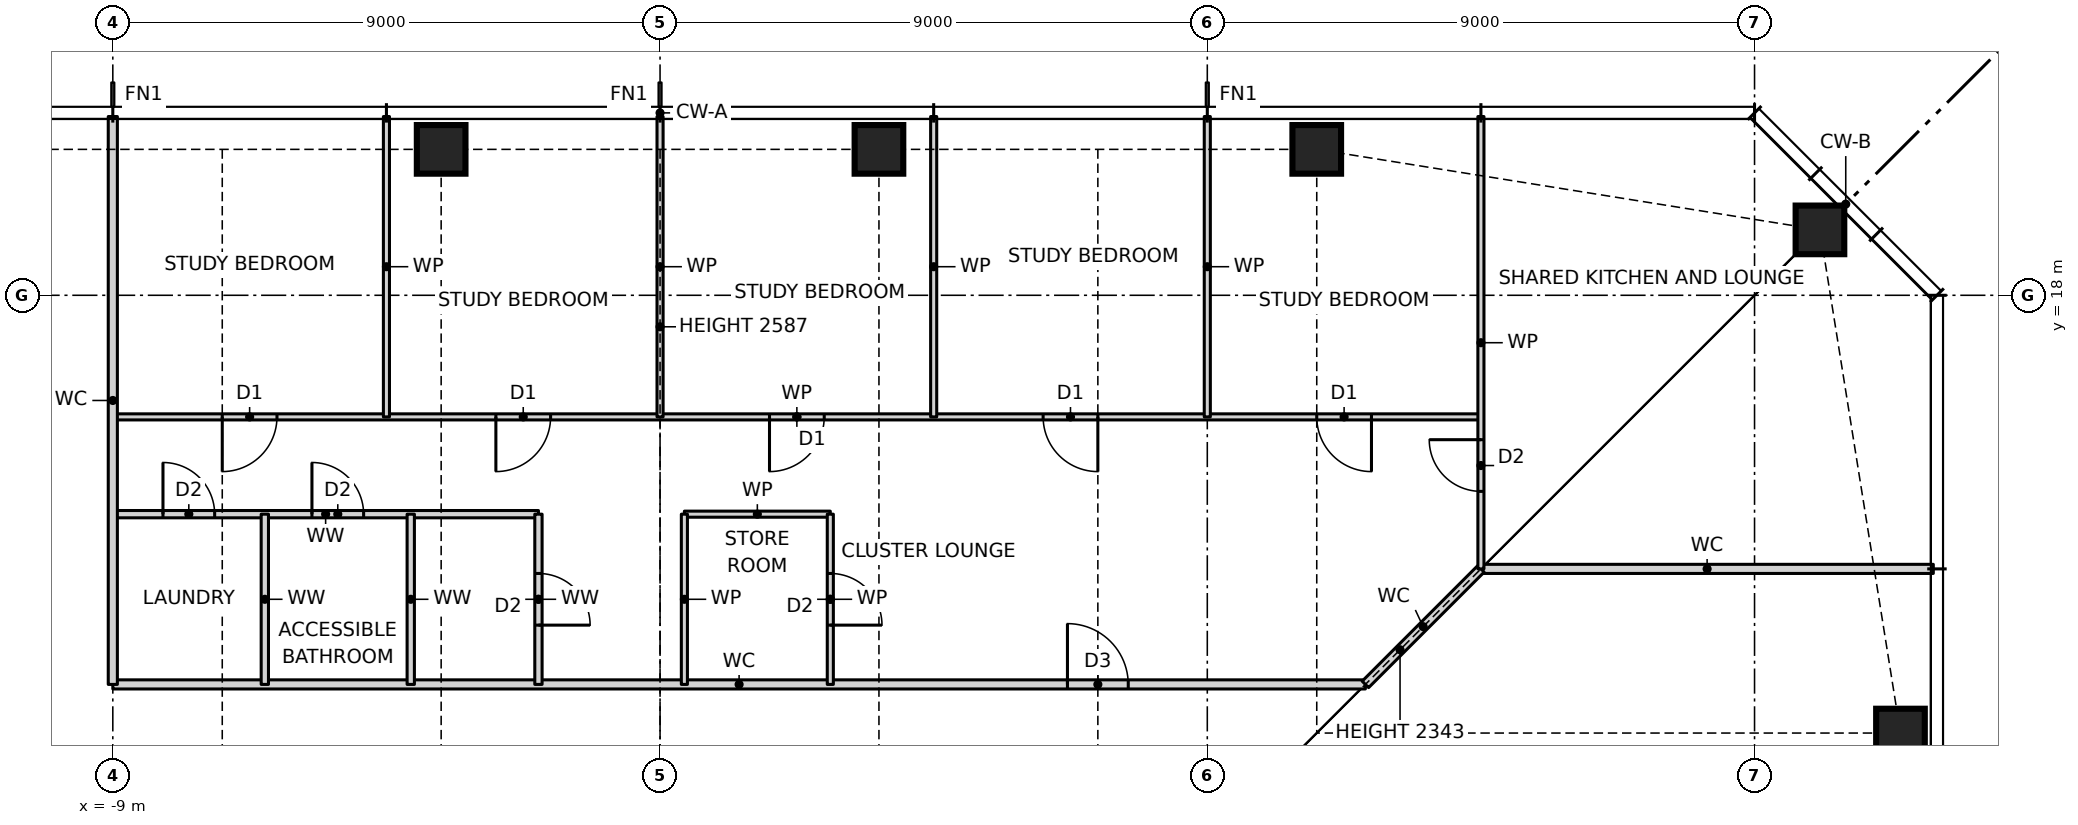
"""IFC4 building model, lengths in metres.
Left out: names, types, materials, properties, quantities, classifications, styles, units other than length and angle.
Written with IfcOpenShell. Run it as: python <this file> out.ifc"""

import sys

from ifc_helpers import new_model, si_unit, direction, frame, frame_2d, origin, origin_2d, place, context, subcontext, project, spatial, rectangle, hollow_rectangle, extrude, element, fill, save


model = new_model("IFC4")
c1 = context("Model", 3, precision=1e-05, world=origin(), true_north=direction((0.0, 1.0)))
c2 = subcontext(c1, "Body", "Model", "MODEL_VIEW")
j1 = project(units=[si_unit("LENGTHUNIT", "METRE"), si_unit("PLANEANGLEUNIT", "RADIAN")], contexts=[c1])
p1 = place(None, origin())
s1 = spatial("IfcSite", under=j1, at=p1, CompositionType="ELEMENT")
p2 = place(p1, origin())
s2 = spatial("IfcBuilding", under=s1, at=p2, CompositionType="ELEMENT")
p3 = place(p2, frame((0.0, 0.0, 91.0)))
s3 = spatial("IfcBuildingStorey", under=s2, at=p3, CompositionType="ELEMENT", Elevation=91.0)
for number, where, z_axis, x_axis in (
    (1, (20.4, 10.8, 0.0), (0.0, 0.0, 1.0), (1.0, 0.0, 0.0)),
    (2, (19.076, 19.076, 0.0), (0.0, 0.0, 1.0), (1.0, 0.0, 0.0)),
    (3, (10.8, 20.4, 0.0), (0.0, 0.0, 1.0), (1.0, 0.0, 0.0)),
    (4, (3.6, 20.4, 0.0), (0.0, 0.0, 1.0), (1.0, 0.0, 0.0)),
    (5, (-3.6, 20.4, 0.0), (0.0, 0.0, 1.0), (1.0, 0.0, 0.0)),
):
    element("IfcColumn", number, at=place(p3, frame(where, z_axis=z_axis, x_axis=x_axis)), inside=s3, PredefinedType="COLUMN", context=c2, shape_type="SweptSolid", body=[
        extrude(hollow_rectangle(XDim=0.8, YDim=0.8, WallThickness=0.07, at=origin_2d()), origin(), (0.0, 0.0, 1.0), 3.5),
    ])
p4 = place(p3, frame((-9.0, 11.6, 0.0), z_axis=(0.0, 0.0, 1.0), x_axis=(1.0, 0.0, 0.0)))
e6 = element("IfcWall", 6, at=p4, inside=s3, PredefinedType="PARTITIONING", context=c2, shape_type="SweptSolid", body=[
    extrude(rectangle(XDim=20.6, YDim=0.15, at=frame_2d((10.3, 0.0))), origin(), (0.0, 0.0, 1.0), 3.27),
])
p5 = place(p4, frame((15.7, 0.0, 0.0)))
e7 = element("IfcOpeningElement", 7, at=p5, cuts=e6, PredefinedType="OPENING", context=c2, shape_type="SweptSolid", body=[
    extrude(rectangle(XDim=1.0, YDim=2.1, at=frame_2d((0.5, 1.05))), frame((0.0, 0.085, 0.0), z_axis=(0.0, -1.0, 0.0), x_axis=(1.0, 0.0, 0.0)), (0.0, 0.0, 1.0), 0.17),
])
p6 = place(p3, frame((13.5, 13.5, 0.0), z_axis=(0.0, 0.0, 1.0), x_axis=(1.0, 0.0, 0.0)))
e8 = element("IfcWall", 8, at=p6, inside=s3, PredefinedType="PARTITIONING", context=c2, shape_type="SweptSolid", body=[
    extrude(rectangle(XDim=7.44, YDim=0.15, at=frame_2d((3.72, 0.0))), origin(), (0.0, 0.0, 1.0), 3.27),
])
p7 = place(p3, frame((-9.0, 14.4, 0.0), z_axis=(0.0, 0.0, 1.0), x_axis=(1.0, 0.0, 0.0)))
e9 = element("IfcWall", 9, at=p7, inside=s3, PredefinedType="PARTITIONING", context=c2, shape_type="SweptSolid", body=[
    extrude(rectangle(XDim=7.0, YDim=0.12, at=frame_2d((3.5, 0.0))), origin(), (0.0, 0.0, 1.0), 3.27),
])
p8 = place(p7, frame((3.275, 0.0, 0.0)))
e10 = element("IfcOpeningElement", 10, at=p8, cuts=e9, PredefinedType="OPENING", context=c2, shape_type="SweptSolid", body=[
    extrude(rectangle(XDim=0.85, YDim=2.1, at=frame_2d((0.425, 1.05))), frame((0.0, 0.07, 0.0), z_axis=(0.0, -1.0, 0.0), x_axis=(1.0, 0.0, 0.0)), (0.0, 0.0, 1.0), 0.14),
])
p9 = place(p7, frame((0.825, 0.0, 0.0)))
e11 = element("IfcOpeningElement", 11, at=p9, cuts=e9, PredefinedType="OPENING", context=c2, shape_type="SweptSolid", body=[
    extrude(rectangle(XDim=0.85, YDim=2.1, at=frame_2d((0.425, 1.05))), frame((0.0, 0.07, 0.0), z_axis=(0.0, -1.0, 0.0), x_axis=(1.0, 0.0, 0.0)), (0.0, 0.0, 1.0), 0.14),
])
p10 = place(p3, frame((0.4, 14.4, 0.0), z_axis=(0.0, 0.0, 1.0), x_axis=(1.0, 0.0, 0.0)))
e12 = element("IfcWall", 12, at=p10, inside=s3, PredefinedType="PARTITIONING", context=c2, shape_type="SweptSolid", body=[
    extrude(rectangle(XDim=2.4, YDim=0.1, at=frame_2d((1.2, 0.0))), origin(), (0.0, 0.0, 1.0), 3.27),
])
p11 = place(p3, frame((-9.0, 16.0, 0.0), z_axis=(0.0, 0.0, 1.0), x_axis=(1.0, 0.0, 0.0)))
e13 = element("IfcWall", 13, at=p11, inside=s3, PredefinedType="PARTITIONING", context=c2, shape_type="SweptSolid", body=[
    extrude(rectangle(XDim=22.5, YDim=0.1, at=frame_2d((11.25, 0.0))), origin(), (0.0, 0.0, 1.0), 3.27),
])
p12 = place(p11, frame((19.8, 0.0, 0.0)))
e14 = element("IfcOpeningElement", 14, at=p12, cuts=e13, PredefinedType="OPENING", context=c2, shape_type="SweptSolid", body=[
    extrude(rectangle(XDim=0.9, YDim=2.1, at=frame_2d((0.45, 1.05))), frame((0.0, 0.06, 0.0), z_axis=(0.0, -1.0, 0.0), x_axis=(1.0, 0.0, 0.0)), (0.0, 0.0, 1.0), 0.12),
])
p13 = place(p11, frame((15.3, 0.0, 0.0)))
e15 = element("IfcOpeningElement", 15, at=p13, cuts=e13, PredefinedType="OPENING", context=c2, shape_type="SweptSolid", body=[
    extrude(rectangle(XDim=0.9, YDim=2.1, at=frame_2d((0.45, 1.05))), frame((0.0, 0.06, 0.0), z_axis=(0.0, -1.0, 0.0), x_axis=(1.0, 0.0, 0.0)), (0.0, 0.0, 1.0), 0.12),
])
p14 = place(p11, frame((10.8, 0.0, 0.0)))
e16 = element("IfcOpeningElement", 16, at=p14, cuts=e13, PredefinedType="OPENING", context=c2, shape_type="SweptSolid", body=[
    extrude(rectangle(XDim=0.9, YDim=2.1, at=frame_2d((0.45, 1.05))), frame((0.0, 0.06, 0.0), z_axis=(0.0, -1.0, 0.0), x_axis=(1.0, 0.0, 0.0)), (0.0, 0.0, 1.0), 0.12),
])
p15 = place(p11, frame((6.3, 0.0, 0.0)))
e17 = element("IfcOpeningElement", 17, at=p15, cuts=e13, PredefinedType="OPENING", context=c2, shape_type="SweptSolid", body=[
    extrude(rectangle(XDim=0.9, YDim=2.1, at=frame_2d((0.45, 1.05))), frame((0.0, 0.06, 0.0), z_axis=(0.0, -1.0, 0.0), x_axis=(1.0, 0.0, 0.0)), (0.0, 0.0, 1.0), 0.12),
])
p16 = place(p11, frame((1.8, 0.0, 0.0)))
e18 = element("IfcOpeningElement", 18, at=p16, cuts=e13, PredefinedType="OPENING", context=c2, shape_type="SweptSolid", body=[
    extrude(rectangle(XDim=0.9, YDim=2.1, at=frame_2d((0.45, 1.05))), frame((0.0, 0.06, 0.0), z_axis=(0.0, -1.0, 0.0), x_axis=(1.0, 0.0, 0.0)), (0.0, 0.0, 1.0), 0.12),
])
p17 = place(p3, frame((11.6, 11.6, 0.0), z_axis=(0.0, 0.0, 1.0), x_axis=(0.707106781187, 0.707106781187, 0.0)))
e19 = element("IfcWall", 19, at=p17, inside=s3, PredefinedType="PARTITIONING", context=c2, shape_type="SweptSolid", body=[
    extrude(rectangle(XDim=2.687, YDim=0.15, at=frame_2d((1.343, 0.0))), origin(), (0.0, 0.0, 1.0), 2.343),
])
p18 = place(p3, frame((13.5, 13.5, 0.0), z_axis=(0.0, 0.0, 1.0), x_axis=(0.0, 1.0, 0.0)))
e20 = element("IfcWall", 20, at=p18, inside=s3, PredefinedType="PARTITIONING", context=c2, shape_type="SweptSolid", body=[
    extrude(rectangle(XDim=7.44, YDim=0.1, at=frame_2d((3.72, 0.0))), origin(), (0.0, 0.0, 1.0), 3.27),
])
p19 = place(p18, frame((1.275, 0.0, 0.0)))
e21 = element("IfcOpeningElement", 21, at=p19, cuts=e20, PredefinedType="OPENING", context=c2, shape_type="SweptSolid", body=[
    extrude(rectangle(XDim=0.85, YDim=2.1, at=frame_2d((0.425, 1.05))), frame((0.0, 0.06, 0.0), z_axis=(0.0, -1.0, 0.0), x_axis=(1.0, 0.0, 0.0)), (0.0, 0.0, 1.0), 0.12),
])
for number, where, z_axis, x_axis in (
    (22, (9.0, 16.0, 0.0), (0.0, 0.0, 1.0), (0.0, 1.0, 0.0)),
    (23, (4.5, 16.0, 0.0), (0.0, 0.0, 1.0), (0.0, 1.0, 0.0)),
):
    element("IfcWall", number, at=place(p3, frame(where, z_axis=z_axis, x_axis=x_axis)), inside=s3, PredefinedType="PARTITIONING", context=c2, shape_type="SweptSolid", body=[
        extrude(rectangle(XDim=4.94, YDim=0.1, at=frame_2d((2.47, 0.0))), origin(), (0.0, 0.0, 1.0), 3.27),
    ])
p20 = place(p3, frame((2.8, 11.6, 0.0), z_axis=(0.0, 0.0, 1.0), x_axis=(0.0, 1.0, 0.0)))
e24 = element("IfcWall", 24, at=p20, inside=s3, PredefinedType="PARTITIONING", context=c2, shape_type="SweptSolid", body=[
    extrude(rectangle(XDim=2.8, YDim=0.1, at=frame_2d((1.4, 0.0))), origin(), (0.0, 0.0, 1.0), 3.27),
])
p21 = place(p20, frame((0.975, 0.0, 0.0)))
e25 = element("IfcOpeningElement", 25, at=p21, cuts=e24, PredefinedType="OPENING", context=c2, shape_type="SweptSolid", body=[
    extrude(rectangle(XDim=0.85, YDim=2.1, at=frame_2d((0.425, 1.05))), frame((0.0, 0.06, 0.0), z_axis=(0.0, -1.0, 0.0), x_axis=(1.0, 0.0, 0.0)), (0.0, 0.0, 1.0), 0.12),
])
p22 = place(p3, frame((0.4, 11.6, 0.0), z_axis=(0.0, 0.0, 1.0), x_axis=(0.0, 1.0, 0.0)))
e26 = element("IfcWall", 26, at=p22, inside=s3, PredefinedType="PARTITIONING", context=c2, shape_type="SweptSolid", body=[
    extrude(rectangle(XDim=2.8, YDim=0.1, at=frame_2d((1.4, 0.0))), origin(), (0.0, 0.0, 1.0), 3.27),
])
p23 = place(p3, frame((0.0, 16.0, 0.0), z_axis=(0.0, 0.0, 1.0), x_axis=(0.0, 1.0, 0.0)))
e27 = element("IfcWall", 27, at=p23, inside=s3, PredefinedType="PARTITIONING", context=c2, shape_type="SweptSolid", body=[
    extrude(rectangle(XDim=4.94, YDim=0.1, at=frame_2d((2.47, 0.0))), origin(), (0.0, 0.0, 1.0), 2.587),
])
p24 = place(p3, frame((-2.0, 11.6, 0.0), z_axis=(0.0, 0.0, 1.0), x_axis=(0.0, 1.0, 0.0)))
e28 = element("IfcWall", 28, at=p24, inside=s3, PredefinedType="PARTITIONING", context=c2, shape_type="SweptSolid", body=[
    extrude(rectangle(XDim=2.8, YDim=0.12, at=frame_2d((1.4, 0.0))), origin(), (0.0, 0.0, 1.0), 3.27),
])
p25 = place(p24, frame((0.975, 0.0, 0.0)))
e29 = element("IfcOpeningElement", 29, at=p25, cuts=e28, PredefinedType="OPENING", context=c2, shape_type="SweptSolid", body=[
    extrude(rectangle(XDim=0.85, YDim=2.1, at=frame_2d((0.425, 1.05))), frame((0.0, 0.07, 0.0), z_axis=(0.0, -1.0, 0.0), x_axis=(1.0, 0.0, 0.0)), (0.0, 0.0, 1.0), 0.14),
])
p26 = place(p3, frame((-4.1, 11.6, 0.0), z_axis=(0.0, 0.0, 1.0), x_axis=(0.0, 1.0, 0.0)))
e30 = element("IfcWall", 30, at=p26, inside=s3, PredefinedType="PARTITIONING", context=c2, shape_type="SweptSolid", body=[
    extrude(rectangle(XDim=2.8, YDim=0.12, at=frame_2d((1.4, 0.0))), origin(), (0.0, 0.0, 1.0), 3.27),
])
p27 = place(p3, frame((-4.5, 16.0, 0.0), z_axis=(0.0, 0.0, 1.0), x_axis=(0.0, 1.0, 0.0)))
e31 = element("IfcWall", 31, at=p27, inside=s3, PredefinedType="PARTITIONING", context=c2, shape_type="SweptSolid", body=[
    extrude(rectangle(XDim=4.94, YDim=0.1, at=frame_2d((2.47, 0.0))), origin(), (0.0, 0.0, 1.0), 3.27),
])
p28 = place(p3, frame((-6.5, 11.6, 0.0), z_axis=(0.0, 0.0, 1.0), x_axis=(0.0, 1.0, 0.0)))
e32 = element("IfcWall", 32, at=p28, inside=s3, PredefinedType="PARTITIONING", context=c2, shape_type="SweptSolid", body=[
    extrude(rectangle(XDim=2.8, YDim=0.12, at=frame_2d((1.4, 0.0))), origin(), (0.0, 0.0, 1.0), 3.27),
])
p29 = place(p3, frame((-9.0, 11.6, 0.0), z_axis=(0.0, 0.0, 1.0), x_axis=(0.0, 1.0, 0.0)))
e33 = element("IfcWall", 33, at=p29, inside=s3, PredefinedType="PARTITIONING", context=c2, shape_type="SweptSolid", body=[
    extrude(rectangle(XDim=9.34, YDim=0.15, at=frame_2d((4.67, 0.0))), origin(), (0.0, 0.0, 1.0), 3.27),
])
p30 = place(p12, frame((0.9, 0.0, 0.0), z_axis=(0.0, 0.0, 1.0), x_axis=(-1.0, 0.0, 0.0)))
e34 = element("IfcDoor", 34, at=p30, inside=s3, OperationType="SINGLE_SWING_LEFT", PredefinedType="DOOR", context=c2, shape_type="SweptSolid", body=[
    extrude(rectangle(XDim=0.9, YDim=2.1, at=frame_2d((0.45, 1.05))), frame((0.0, 0.025, 0.0), z_axis=(0.0, -1.0, 0.0), x_axis=(1.0, 0.0, 0.0)), (0.0, 0.0, 1.0), 0.05),
])
fill(e14, e34)
p31 = place(p13, frame((0.9, 0.0, 0.0), z_axis=(0.0, 0.0, 1.0), x_axis=(-1.0, 0.0, 0.0)))
e35 = element("IfcDoor", 35, at=p31, inside=s3, OperationType="SINGLE_SWING_LEFT", PredefinedType="DOOR", context=c2, shape_type="SweptSolid", body=[
    extrude(rectangle(XDim=0.9, YDim=2.1, at=frame_2d((0.45, 1.05))), frame((0.0, 0.025, 0.0), z_axis=(0.0, -1.0, 0.0), x_axis=(1.0, 0.0, 0.0)), (0.0, 0.0, 1.0), 0.05),
])
fill(e15, e35)
p32 = place(p14, frame((0.9, 0.0, 0.0), z_axis=(0.0, 0.0, 1.0), x_axis=(-1.0, 0.0, 0.0)))
e36 = element("IfcDoor", 36, at=p32, inside=s3, OperationType="SINGLE_SWING_RIGHT", PredefinedType="DOOR", context=c2, shape_type="SweptSolid", body=[
    extrude(rectangle(XDim=0.9, YDim=2.1, at=frame_2d((0.45, 1.05))), frame((0.0, 0.025, 0.0), z_axis=(0.0, -1.0, 0.0), x_axis=(1.0, 0.0, 0.0)), (0.0, 0.0, 1.0), 0.05),
])
fill(e16, e36)
p33 = place(p15, frame((0.9, 0.0, 0.0), z_axis=(0.0, 0.0, 1.0), x_axis=(-1.0, 0.0, 0.0)))
e37 = element("IfcDoor", 37, at=p33, inside=s3, OperationType="SINGLE_SWING_RIGHT", PredefinedType="DOOR", context=c2, shape_type="SweptSolid", body=[
    extrude(rectangle(XDim=0.9, YDim=2.1, at=frame_2d((0.45, 1.05))), frame((0.0, 0.025, 0.0), z_axis=(0.0, -1.0, 0.0), x_axis=(1.0, 0.0, 0.0)), (0.0, 0.0, 1.0), 0.05),
])
fill(e17, e37)
p34 = place(p16, frame((0.9, 0.0, 0.0), z_axis=(0.0, 0.0, 1.0), x_axis=(-1.0, 0.0, 0.0)))
e38 = element("IfcDoor", 38, at=p34, inside=s3, OperationType="SINGLE_SWING_RIGHT", PredefinedType="DOOR", context=c2, shape_type="SweptSolid", body=[
    extrude(rectangle(XDim=0.9, YDim=2.1, at=frame_2d((0.45, 1.05))), frame((0.0, 0.025, 0.0), z_axis=(0.0, -1.0, 0.0), x_axis=(1.0, 0.0, 0.0)), (0.0, 0.0, 1.0), 0.05),
])
fill(e18, e38)
p35 = place(p5, origin())
e39 = element("IfcDoor", 39, at=p35, inside=s3, OperationType="SINGLE_SWING_LEFT", PredefinedType="DOOR", context=c2, shape_type="SweptSolid", body=[
    extrude(rectangle(XDim=1.0, YDim=2.1, at=frame_2d((0.5, 1.05))), frame((0.0, 0.025, 0.0), z_axis=(0.0, -1.0, 0.0), x_axis=(1.0, 0.0, 0.0)), (0.0, 0.0, 1.0), 0.05),
])
fill(e7, e39)
p36 = place(p21, frame((0.85, 0.0, 0.0), z_axis=(0.0, 0.0, 1.0), x_axis=(-1.0, 0.0, 0.0)))
e40 = element("IfcDoor", 40, at=p36, inside=s3, OperationType="SINGLE_SWING_RIGHT", PredefinedType="DOOR", context=c2, shape_type="SweptSolid", body=[
    extrude(rectangle(XDim=0.85, YDim=2.1, at=frame_2d((0.425, 1.05))), frame((0.0, 0.025, 0.0), z_axis=(0.0, -1.0, 0.0), x_axis=(1.0, 0.0, 0.0)), (0.0, 0.0, 1.0), 0.05),
])
fill(e25, e40)
p37 = place(p25, frame((0.85, 0.0, 0.0), z_axis=(0.0, 0.0, 1.0), x_axis=(-1.0, 0.0, 0.0)))
e41 = element("IfcDoor", 41, at=p37, inside=s3, OperationType="SINGLE_SWING_RIGHT", PredefinedType="DOOR", context=c2, shape_type="SweptSolid", body=[
    extrude(rectangle(XDim=0.85, YDim=2.1, at=frame_2d((0.425, 1.05))), frame((0.0, 0.025, 0.0), z_axis=(0.0, -1.0, 0.0), x_axis=(1.0, 0.0, 0.0)), (0.0, 0.0, 1.0), 0.05),
])
fill(e29, e41)
p38 = place(p8, origin())
e42 = element("IfcDoor", 42, at=p38, inside=s3, OperationType="SINGLE_SWING_LEFT", PredefinedType="DOOR", context=c2, shape_type="SweptSolid", body=[
    extrude(rectangle(XDim=0.85, YDim=2.1, at=frame_2d((0.425, 1.05))), frame((0.0, 0.025, 0.0), z_axis=(0.0, -1.0, 0.0), x_axis=(1.0, 0.0, 0.0)), (0.0, 0.0, 1.0), 0.05),
])
fill(e10, e42)
p39 = place(p9, origin())
e43 = element("IfcDoor", 43, at=p39, inside=s3, OperationType="SINGLE_SWING_LEFT", PredefinedType="DOOR", context=c2, shape_type="SweptSolid", body=[
    extrude(rectangle(XDim=0.85, YDim=2.1, at=frame_2d((0.425, 1.05))), frame((0.0, 0.025, 0.0), z_axis=(0.0, -1.0, 0.0), x_axis=(1.0, 0.0, 0.0)), (0.0, 0.0, 1.0), 0.05),
])
fill(e11, e43)
p40 = place(p19, origin())
e44 = element("IfcDoor", 44, at=p40, inside=s3, OperationType="SINGLE_SWING_RIGHT", PredefinedType="DOOR", context=c2, shape_type="SweptSolid", body=[
    extrude(rectangle(XDim=0.85, YDim=2.1, at=frame_2d((0.425, 1.05))), frame((0.0, 0.025, 0.0), z_axis=(0.0, -1.0, 0.0), x_axis=(1.0, 0.0, 0.0)), (0.0, 0.0, 1.0), 0.05),
])
fill(e21, e44)
save(model, sys.argv[1])
